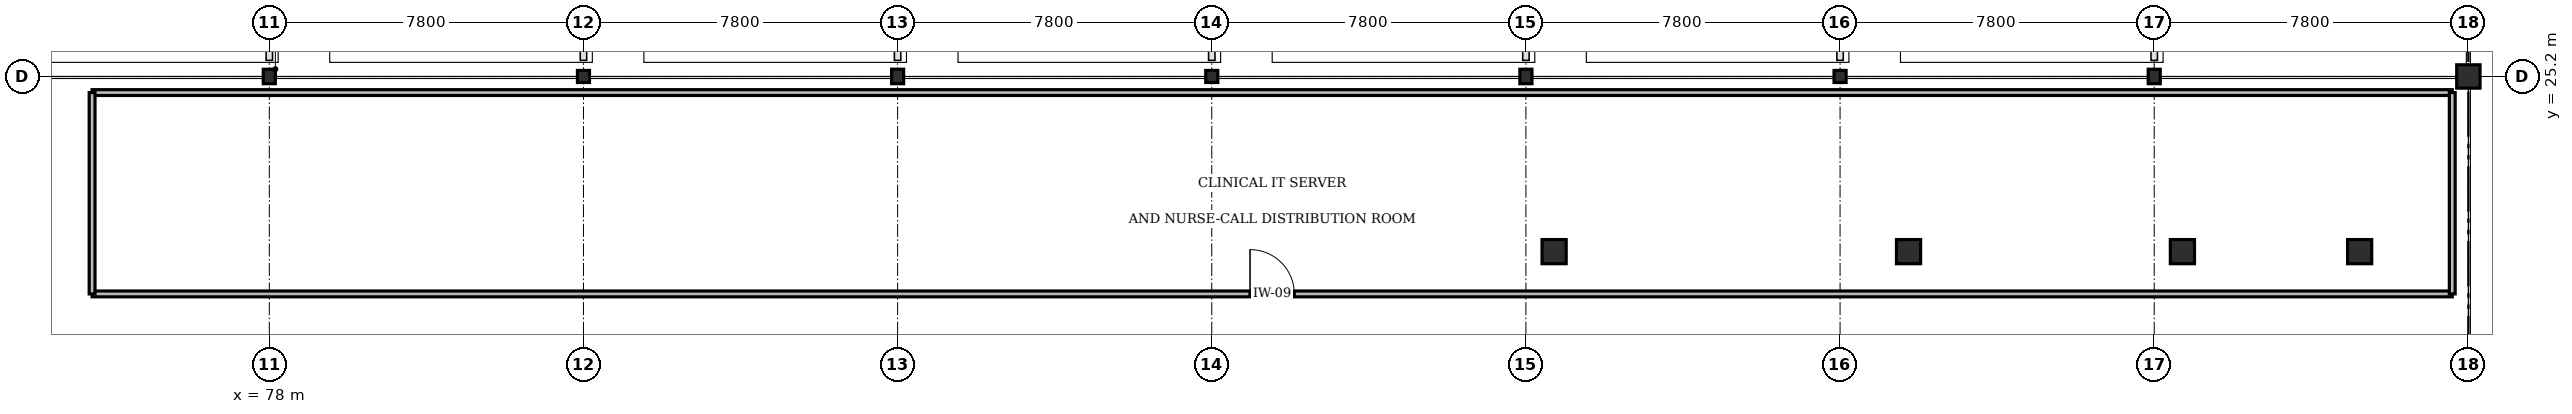
"""IFC4 building model, lengths in metres.
Left out: names, types, materials, properties, quantities, classifications, styles, units other than length and angle.
Written with IfcOpenShell. Run it as: python <this file> out.ifc"""

import sys

from ifc_helpers import new_model, si_unit, direction, frame, frame_2d, origin, origin_2d, place, context, subcontext, project, spatial, rectangle, circle, i_section, extrude, element, fill, save


model = new_model("IFC4")
c1 = context("Model", 3, precision=1e-05, world=origin(), true_north=direction((0.0, 1.0)))
c2 = subcontext(c1, "Body", "Model", "MODEL_VIEW")
j1 = project(units=[si_unit("LENGTHUNIT", "METRE"), si_unit("PLANEANGLEUNIT", "RADIAN")], contexts=[c1])
p1 = place(None, origin())
s1 = spatial("IfcSite", under=j1, at=p1, CompositionType="ELEMENT")
p2 = place(p1, origin())
s2 = spatial("IfcBuilding", under=s1, at=p2, CompositionType="ELEMENT")
p3 = place(p2, frame((0.0, 0.0, 14.4)))
s3 = spatial("IfcBuildingStorey", under=s2, at=p3, CompositionType="ELEMENT", Elevation=14.4)
p4 = place(p3, frame((78.0, 25.2, 0.0), z_axis=(0.0, 0.0, 1.0), x_axis=(1.0, 0.0, 0.0)))
e1 = element("IfcColumn", 1, at=p4, inside=s3, PredefinedType="COLUMN", context=c2, shape_type="SweptSolid", body=[
    extrude(i_section(OverallWidth=0.3, OverallDepth=0.36, WebThickness=0.012, FlangeThickness=0.022, FilletRadius=0.027, at=origin_2d()), origin(), (0.0, 0.0, 1.0), 3.6),
])
p5 = place(p3, frame((85.8, 25.2, 0.0), z_axis=(0.0, 0.0, 1.0), x_axis=(1.0, 0.0, 0.0)))
e2 = element("IfcColumn", 2, at=p5, inside=s3, PredefinedType="COLUMN", context=c2, shape_type="SweptSolid", body=[
    extrude(i_section(OverallWidth=0.3, OverallDepth=0.3, WebThickness=0.011, FlangeThickness=0.019, FilletRadius=0.027, at=origin_2d()), origin(), (0.0, 0.0, 1.0), 3.6),
])
p6 = place(p3, frame((93.6, 25.2, 0.0), z_axis=(0.0, 0.0, 1.0), x_axis=(1.0, 0.0, 0.0)))
e3 = element("IfcColumn", 3, at=p6, inside=s3, PredefinedType="COLUMN", context=c2, shape_type="SweptSolid", body=[
    extrude(i_section(OverallWidth=0.3, OverallDepth=0.36, WebThickness=0.012, FlangeThickness=0.022, FilletRadius=0.027, at=origin_2d()), origin(), (0.0, 0.0, 1.0), 3.6),
])
p7 = place(p3, frame((101.4, 25.2, 0.0), z_axis=(0.0, 0.0, 1.0), x_axis=(1.0, 0.0, 0.0)))
e4 = element("IfcColumn", 4, at=p7, inside=s3, PredefinedType="COLUMN", context=c2, shape_type="SweptSolid", body=[
    extrude(i_section(OverallWidth=0.3, OverallDepth=0.3, WebThickness=0.011, FlangeThickness=0.019, FilletRadius=0.027, at=origin_2d()), origin(), (0.0, 0.0, 1.0), 3.6),
])
p8 = place(p3, frame((109.2, 25.2, 0.0), z_axis=(0.0, 0.0, 1.0), x_axis=(1.0, 0.0, 0.0)))
e5 = element("IfcColumn", 5, at=p8, inside=s3, PredefinedType="COLUMN", context=c2, shape_type="SweptSolid", body=[
    extrude(i_section(OverallWidth=0.3, OverallDepth=0.36, WebThickness=0.012, FlangeThickness=0.022, FilletRadius=0.027, at=origin_2d()), origin(), (0.0, 0.0, 1.0), 3.6),
])
p9 = place(p3, frame((117.0, 25.2, 0.0), z_axis=(0.0, 0.0, 1.0), x_axis=(1.0, 0.0, 0.0)))
e6 = element("IfcColumn", 6, at=p9, inside=s3, PredefinedType="COLUMN", context=c2, shape_type="SweptSolid", body=[
    extrude(i_section(OverallWidth=0.3, OverallDepth=0.3, WebThickness=0.011, FlangeThickness=0.019, FilletRadius=0.027, at=origin_2d()), origin(), (0.0, 0.0, 1.0), 3.6),
])
p10 = place(p3, frame((124.8, 25.2, 0.0), z_axis=(0.0, 0.0, 1.0), x_axis=(1.0, 0.0, 0.0)))
e7 = element("IfcColumn", 7, at=p10, inside=s3, PredefinedType="COLUMN", context=c2, shape_type="SweptSolid", body=[
    extrude(i_section(OverallWidth=0.3, OverallDepth=0.36, WebThickness=0.012, FlangeThickness=0.022, FilletRadius=0.027, at=origin_2d()), origin(), (0.0, 0.0, 1.0), 3.6),
])
p11 = place(p3, frame((132.6, 25.2, 0.0), z_axis=(0.0, 0.0, 1.0), x_axis=(1.0, 0.0, 0.0)))
e8 = element("IfcColumn", 8, at=p11, inside=s3, PredefinedType="COLUMN", context=c2, shape_type="SweptSolid", body=[
    extrude(rectangle(XDim=0.58, YDim=0.58, at=origin_2d()), origin(), (0.0, 0.0, 1.0), 3.6),
])
for number, where, z_axis, x_axis in (
    (9, (129.9, 20.85, 0.0), (0.0, 0.0, 1.0), (1.0, 0.0, 0.0)),
    (10, (125.5, 20.85, 0.0), (0.0, 0.0, 1.0), (1.0, 0.0, 0.0)),
    (11, (118.7, 20.85, 0.0), (0.0, 0.0, 1.0), (1.0, 0.0, 0.0)),
    (12, (109.9, 20.85, 0.0), (0.0, 0.0, 1.0), (1.0, 0.0, 0.0)),
):
    element("IfcColumn", number, at=place(p3, frame(where, z_axis=z_axis, x_axis=x_axis)), inside=s3, PredefinedType="PILASTER", context=c2, shape_type="SweptSolid", body=[
        extrude(circle(Radius=0.3, at=origin_2d()), origin(), (0.0, 0.0, 1.0), 3.6),
    ])
p12 = place(p3, frame((73.6, 19.8, 0.0), z_axis=(0.0, 0.0, 1.0), x_axis=(1.0, 0.0, 0.0)))
e13 = element("IfcWall", 13, at=p12, inside=s3, PredefinedType="PARTITIONING", context=c2, shape_type="SweptSolid", body=[
    extrude(rectangle(XDim=58.6, YDim=0.145, at=frame_2d((29.3, 0.0))), origin(), (0.0, 0.0, 1.0), 3.3),
])
p13 = place(p12, frame((28.75, 0.0, 0.0)))
e14 = element("IfcOpeningElement", 14, at=p13, cuts=e13, PredefinedType="OPENING", context=c2, shape_type="SweptSolid", body=[
    extrude(rectangle(XDim=1.1, YDim=2.15, at=frame_2d((0.55, 1.075))), frame((0.0, 0.083, 0.0), z_axis=(0.0, -1.0, 0.0), x_axis=(1.0, 0.0, 0.0)), (0.0, 0.0, 1.0), 0.165),
])
p14 = place(p3, frame((73.6, 24.8, 0.0), z_axis=(0.0, 0.0, 1.0), x_axis=(1.0, 0.0, 0.0)))
e15 = element("IfcWall", 15, at=p14, inside=s3, PredefinedType="PARTITIONING", context=c2, shape_type="SweptSolid", body=[
    extrude(rectangle(XDim=58.6, YDim=0.145, at=frame_2d((29.3, 0.0))), origin(), (0.0, 0.0, 1.0), 2.62),
])
p15 = place(p3, frame((73.6, 19.8, 0.0), z_axis=(0.0, 0.0, 1.0), x_axis=(0.0, 1.0, 0.0)))
e16 = element("IfcWall", 16, at=p15, inside=s3, PredefinedType="PARTITIONING", context=c2, shape_type="SweptSolid", body=[
    extrude(rectangle(XDim=5.0, YDim=0.145, at=frame_2d((2.5, 0.0))), origin(), (0.0, 0.0, 1.0), 3.3),
])
p16 = place(p3, frame((132.2, 19.8, 0.0), z_axis=(0.0, 0.0, 1.0), x_axis=(0.0, 1.0, 0.0)))
e17 = element("IfcWall", 17, at=p16, inside=s3, PredefinedType="PARTITIONING", context=c2, shape_type="SweptSolid", body=[
    extrude(rectangle(XDim=5.0, YDim=0.145, at=frame_2d((2.5, 0.0))), origin(), (0.0, 0.0, 1.0), 2.62),
])
p17 = place(p13, origin())
e18 = element("IfcDoor", 18, at=p17, inside=s3, OperationType="SINGLE_SWING_LEFT", PredefinedType="DOOR", context=c2, shape_type="SweptSolid", body=[
    extrude(rectangle(XDim=1.1, YDim=2.15, at=frame_2d((0.55, 1.075))), frame((0.0, 0.025, 0.0), z_axis=(0.0, -1.0, 0.0), x_axis=(1.0, 0.0, 0.0)), (0.0, 0.0, 1.0), 0.05),
])
fill(e14, e18)
save(model, sys.argv[1])
